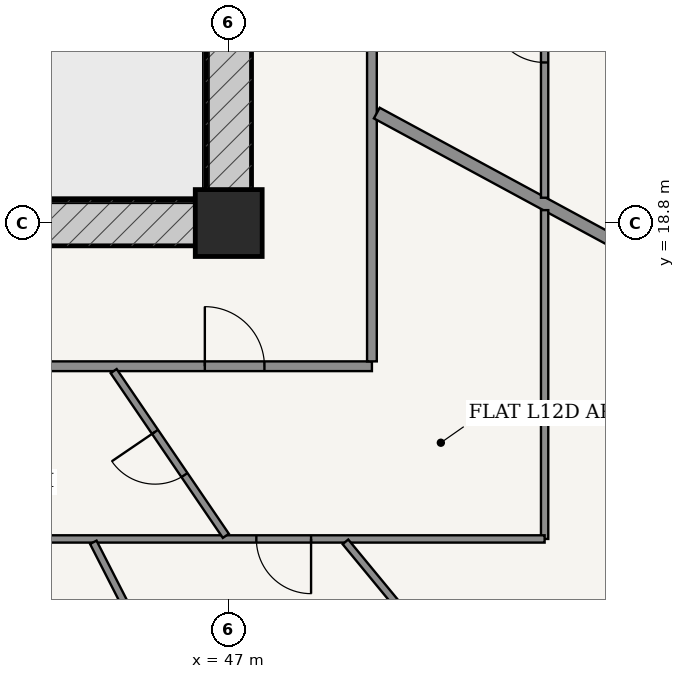
"""IFC4 building model, lengths in metres.
Left out: names, types, materials, properties, quantities, classifications, styles, units other than length and angle.
Written with IfcOpenShell. Run it as: python <this file> out.ifc"""

import sys

from ifc_helpers import new_model, si_unit, direction, frame, frame_2d, origin, origin_2d, place, context, subcontext, project, spatial, rectangle, extrude, source, transform, mapped, element, fill, save


model = new_model("IFC4")
c1 = context("Model", 3, precision=1e-05, world=origin(), true_north=direction((-0.2419218956, 0.970295726276)))
c2 = subcontext(c1, "Body", "Model", "MODEL_VIEW")
j1 = project(units=[si_unit("LENGTHUNIT", "METRE"), si_unit("PLANEANGLEUNIT", "RADIAN")], contexts=[c1])
p1 = place(None, origin())
s1 = spatial("IfcSite", under=j1, at=p1, CompositionType="ELEMENT")
p2 = place(p1, origin())
s2 = spatial("IfcBuilding", under=s1, at=p2, CompositionType="ELEMENT")
p3 = place(p2, frame((0.0, 0.0, 49.2)))
s3 = spatial("IfcBuildingStorey", under=s2, at=p3, CompositionType="ELEMENT", Elevation=49.2)
p4 = place(p3, frame((47.0, 18.8, 0.0), z_axis=(0.0, 0.0, 1.0), x_axis=(1.0, 0.0, 0.0)))
e1 = element("IfcColumn", 1, at=p4, inside=s3, PredefinedType="COLUMN", context=c2, shape_type="SweptSolid", body=[
    extrude(rectangle(XDim=1.1, YDim=1.1, at=origin_2d()), origin(), (0.0, 0.0, 1.0), 3.6),
])
p5 = place(p3, frame((28.625, 18.8, 0.0), z_axis=(0.0, 0.0, 1.0), x_axis=(1.0, 0.0, 0.0)))
e2 = element("IfcWall", 2, at=p5, inside=s3, PredefinedType="SHEAR", context=c2, shape_type="SweptSolid", body=[
    extrude(rectangle(XDim=18.75, YDim=0.75, at=frame_2d((9.375, 0.0))), origin(), (0.0, 0.0, 1.0), 3.32),
])
p6 = place(p5, frame((7.627, 0.0, 0.0)))
e3 = element("IfcOpeningElement", 3, at=p6, cuts=e2, PredefinedType="OPENING", context=c2, shape_type="SweptSolid", body=[
    extrude(rectangle(XDim=0.85, YDim=2.1, at=frame_2d((0.425, 1.05))), frame((0.0, 0.385, 0.0), z_axis=(0.0, -1.0, 0.0), x_axis=(1.0, 0.0, 0.0)), (0.0, 0.0, 1.0), 0.77),
])
p7 = place(p5, frame((10.673, 0.0, 0.0)))
e4 = element("IfcOpeningElement", 4, at=p7, cuts=e2, PredefinedType="OPENING", context=c2, shape_type="SweptSolid", body=[
    extrude(rectangle(XDim=0.85, YDim=2.1, at=frame_2d((0.425, 1.05))), frame((0.0, 0.385, 0.0), z_axis=(0.0, -1.0, 0.0), x_axis=(1.0, 0.0, 0.0)), (0.0, 0.0, 1.0), 0.77),
])
p8 = place(p3, frame((47.0, 19.175, 0.0), z_axis=(0.0, 0.0, 1.0), x_axis=(0.0, 1.0, 0.0)))
e5 = element("IfcWall", 5, at=p8, inside=s3, PredefinedType="SHEAR", context=c2, shape_type="SweptSolid", body=[
    extrude(rectangle(XDim=15.25, YDim=0.75, at=frame_2d((7.625, 0.0))), origin(), (0.0, 0.0, 1.0), 3.32),
])
p9 = place(p8, frame((9.875, 0.0, 0.0)))
e6 = element("IfcOpeningElement", 6, at=p9, cuts=e5, PredefinedType="OPENING", context=c2, shape_type="SweptSolid", body=[
    extrude(rectangle(XDim=1.5, YDim=2.2, at=frame_2d((0.75, 1.1))), frame((0.0, 0.385, 0.0), z_axis=(0.0, -1.0, 0.0), x_axis=(1.0, 0.0, 0.0)), (0.0, 0.0, 1.0), 0.77),
])
p10 = place(p3, frame((26.645, 16.445, 0.0), z_axis=(0.0, 0.0, 1.0), x_axis=(1.0, 0.0, 0.0)))
e7 = element("IfcWall", 7, at=p10, inside=s3, PredefinedType="PARTITIONING", context=c2, shape_type="SweptSolid", body=[
    extrude(rectangle(XDim=22.71, YDim=0.16, at=frame_2d((11.355, 0.0))), origin(), (0.0, 0.0, 1.0), 2.688),
])
p11 = place(p10, frame((19.962, 0.0, 0.0)))
e8 = element("IfcOpeningElement", 8, at=p11, cuts=e7, PredefinedType="OPENING", context=c2, shape_type="SweptSolid", body=[
    extrude(rectangle(XDim=0.98, YDim=2.2, at=frame_2d((0.49, 1.1))), frame((0.0, 0.09, 0.0), z_axis=(0.0, -1.0, 0.0), x_axis=(1.0, 0.0, 0.0)), (0.0, 0.0, 1.0), 0.18),
])
p12 = place(p3, frame((49.355, 16.525, 0.0), z_axis=(0.0, 0.0, 1.0), x_axis=(0.0, 1.0, 0.0)))
e9 = element("IfcWall", 9, at=p12, inside=s3, PredefinedType="PARTITIONING", context=c2, shape_type="SweptSolid", body=[
    extrude(rectangle(XDim=20.55, YDim=0.16, at=frame_2d((10.275, 0.0))), origin(), (0.0, 0.0, 1.0), 2.688),
])
p13 = place(p3, frame((49.435, 20.608, 0.0), z_axis=(0.0, 0.0, 1.0), x_axis=(0.879369737803, -0.476139542819, 0.0)))
e10 = element("IfcWall", 10, at=p13, inside=s3, PredefinedType="PARTITIONING", context=c2, shape_type="SweptSolid", body=[
    extrude(rectangle(XDim=14.295, YDim=0.2, at=frame_2d((7.147, 0.0))), origin(), (0.0, 0.0, 1.0), 2.688),
])
p14 = place(p3, frame((52.195, 39.995, 0.0), z_axis=(0.0, 0.0, 1.0), x_axis=(0.0, -1.0, 0.0)))
e11 = element("IfcWall", 11, at=p14, inside=s3, PredefinedType="PARTITIONING", context=c2, shape_type="SweptSolid", body=[
    extrude(rectangle(XDim=20.779, YDim=0.12, at=frame_2d((10.39, 0.0))), origin(), (0.0, 0.0, 1.0), 2.688),
])
p15 = place(p14, frame((13.944, 0.0, 0.0)))
e12 = element("IfcOpeningElement", 12, at=p15, cuts=e11, PredefinedType="OPENING", context=c2, shape_type="SweptSolid", body=[
    extrude(rectangle(XDim=0.9, YDim=2.15, at=frame_2d((0.45, 1.075))), frame((0.0, 0.07, 0.0), z_axis=(0.0, -1.0, 0.0), x_axis=(1.0, 0.0, 0.0)), (0.0, 0.0, 1.0), 0.14),
])
p16 = place(p14, frame((17.655, 0.0, 0.0)))
e13 = element("IfcOpeningElement", 13, at=p16, cuts=e11, PredefinedType="OPENING", context=c2, shape_type="SweptSolid", body=[
    extrude(rectangle(XDim=0.9, YDim=2.15, at=frame_2d((0.45, 1.075))), frame((0.0, 0.07, 0.0), z_axis=(0.0, -1.0, 0.0), x_axis=(1.0, 0.0, 0.0)), (0.0, 0.0, 1.0), 0.14),
])
p17 = place(p3, frame((52.195, 19.012, 0.0), z_axis=(0.0, 0.0, 1.0), x_axis=(0.0, -1.0, 0.0)))
e14 = element("IfcWall", 14, at=p17, inside=s3, PredefinedType="PARTITIONING", context=c2, shape_type="SweptSolid", body=[
    extrude(rectangle(XDim=5.407, YDim=0.12, at=frame_2d((2.704, 0.0))), origin(), (0.0, 0.0, 1.0), 2.999),
])
p18 = place(p3, frame((52.195, 13.605, 0.0), z_axis=(0.0, 0.0, 1.0), x_axis=(-1.0, 0.0, 0.0)))
e15 = element("IfcWall", 15, at=p18, inside=s3, PredefinedType="PARTITIONING", context=c2, shape_type="SweptSolid", body=[
    extrude(rectangle(XDim=24.973, YDim=0.12, at=frame_2d((12.487, 0.0))), origin(), (0.0, 0.0, 1.0), 2.688),
])
p19 = place(p18, frame((3.841, 0.0, 0.0)))
e16 = element("IfcOpeningElement", 16, at=p19, cuts=e15, PredefinedType="OPENING", context=c2, shape_type="SweptSolid", body=[
    extrude(rectangle(XDim=0.9, YDim=2.15, at=frame_2d((0.45, 1.075))), frame((0.0, 0.07, 0.0), z_axis=(0.0, -1.0, 0.0), x_axis=(1.0, 0.0, 0.0)), (0.0, 0.0, 1.0), 0.14),
])
p20 = place(p18, frame((15.819, 0.0, 0.0)))
e17 = element("IfcOpeningElement", 17, at=p20, cuts=e15, PredefinedType="OPENING", context=c2, shape_type="SweptSolid", body=[
    extrude(rectangle(XDim=0.9, YDim=2.15, at=frame_2d((0.45, 1.075))), frame((0.0, 0.07, 0.0), z_axis=(0.0, -1.0, 0.0), x_axis=(1.0, 0.0, 0.0)), (0.0, 0.0, 1.0), 0.14),
])
p21 = place(p18, frame((21.123, 0.0, 0.0)))
e18 = element("IfcOpeningElement", 18, at=p21, cuts=e15, PredefinedType="OPENING", context=c2, shape_type="SweptSolid", body=[
    extrude(rectangle(XDim=0.9, YDim=2.15, at=frame_2d((0.45, 1.075))), frame((0.0, 0.07, 0.0), z_axis=(0.0, -1.0, 0.0), x_axis=(1.0, 0.0, 0.0)), (0.0, 0.0, 1.0), 0.14),
])
p22 = place(p3, frame((44.773, 13.55, 0.0), z_axis=(0.0, 0.0, 1.0), x_axis=(0.455131567849, -0.890424200001, 0.0)))
e19 = element("IfcWall", 19, at=p22, inside=s3, PredefinedType="PARTITIONING", context=c2, shape_type="SweptSolid", body=[
    extrude(rectangle(XDim=9.439, YDim=0.12, at=frame_2d((4.719, 0.0))), origin(), (0.0, 0.0, 1.0), 2.762),
])
p23 = place(p22, frame((4.269, 0.0, 0.0)))
e20 = element("IfcOpeningElement", 20, at=p23, cuts=e19, PredefinedType="OPENING", context=c2, shape_type="SweptSolid", body=[
    extrude(rectangle(XDim=0.9, YDim=2.15, at=frame_2d((0.45, 1.075))), frame((0.0, 0.07, 0.0), z_axis=(0.0, -1.0, 0.0), x_axis=(1.0, 0.0, 0.0)), (0.0, 0.0, 1.0), 0.14),
])
p24 = place(p3, frame((48.919, 13.557, 0.0), z_axis=(0.0, 0.0, 1.0), x_axis=(0.636193310573, -0.771529695852, 0.0)))
e21 = element("IfcWall", 21, at=p24, inside=s3, PredefinedType="PARTITIONING", context=c2, shape_type="SweptSolid", body=[
    extrude(rectangle(XDim=8.044, YDim=0.12, at=frame_2d((4.022, 0.0))), origin(), (0.0, 0.0, 1.0), 2.688),
])
p25 = place(p24, frame((2.508, 0.0, 0.0)))
e22 = element("IfcOpeningElement", 22, at=p25, cuts=e21, PredefinedType="OPENING", context=c2, shape_type="SweptSolid", body=[
    extrude(rectangle(XDim=0.9, YDim=2.15, at=frame_2d((0.45, 1.075))), frame((0.0, 0.07, 0.0), z_axis=(0.0, -1.0, 0.0), x_axis=(1.0, 0.0, 0.0)), (0.0, 0.0, 1.0), 0.14),
])
p26 = place(p3, frame((45.108, 16.365, 0.0), z_axis=(0.0, 0.0, 1.0), x_axis=(0.562992379509, -0.826462086617, 0.0)))
e23 = element("IfcWall", 23, at=p26, inside=s3, PredefinedType="PARTITIONING", context=c2, shape_type="SweptSolid", body=[
    extrude(rectangle(XDim=3.278, YDim=0.12, at=frame_2d((1.639, 0.0))), origin(), (0.0, 0.0, 1.0), 3.32),
])
p27 = place(p26, frame((1.209, 0.0, 0.0)))
e24 = element("IfcOpeningElement", 24, at=p27, cuts=e23, PredefinedType="OPENING", context=c2, shape_type="SweptSolid", body=[
    extrude(rectangle(XDim=0.86, YDim=2.15, at=frame_2d((0.43, 1.075))), frame((0.0, 0.07, 0.0), z_axis=(0.0, -1.0, 0.0), x_axis=(1.0, 0.0, 0.0)), (0.0, 0.0, 1.0), 0.14),
])
m1 = source(origin(), c2, "Body", "SweptSolid", [
    extrude(rectangle(XDim=0.9, YDim=2.15, at=frame_2d((0.45, 1.075))), frame((0.0, 0.025, 0.0), z_axis=(0.0, -1.0, 0.0), x_axis=(1.0, 0.0, 0.0)), (0.0, 0.0, 1.0), 0.05),
])
p28 = place(p16, frame((0.9, 0.0, 0.0), z_axis=(0.0, 0.0, 1.0), x_axis=(-1.0, 0.0, 0.0)))
e25 = element("IfcDoor", 25, at=p28, inside=s3, OperationType="SINGLE_SWING_RIGHT", PredefinedType="DOOR", context=c2, shape_type="MappedRepresentation", body=[
    mapped(m1, transform((0.0, 0.0, 0.0), scale=1.0)),
])
fill(e13, e25)
m2 = source(origin(), c2, "Body", "SweptSolid", [
    extrude(rectangle(XDim=0.98, YDim=2.2, at=frame_2d((0.49, 1.1))), frame((0.0, 0.025, 0.0), z_axis=(0.0, -1.0, 0.0), x_axis=(1.0, 0.0, 0.0)), (0.0, 0.0, 1.0), 0.05),
])
p29 = place(p11, origin())
e26 = element("IfcDoor", 26, at=p29, inside=s3, OperationType="SINGLE_SWING_LEFT", PredefinedType="DOOR", context=c2, shape_type="MappedRepresentation", body=[
    mapped(m2, transform((0.0, 0.0, 0.0), scale=1.0)),
])
fill(e8, e26)
m3 = source(origin(), c2, "Body", "SweptSolid", [
    extrude(rectangle(XDim=0.86, YDim=2.15, at=frame_2d((0.43, 1.075))), frame((0.0, 0.025, 0.0), z_axis=(0.0, -1.0, 0.0), x_axis=(1.0, 0.0, 0.0)), (0.0, 0.0, 1.0), 0.05),
])
p30 = place(p27, frame((0.86, 0.0, 0.0), z_axis=(0.0, 0.0, 1.0), x_axis=(-1.0, 0.0, 0.0)))
e27 = element("IfcDoor", 27, at=p30, inside=s3, OperationType="SINGLE_SWING_RIGHT", PredefinedType="DOOR", context=c2, shape_type="MappedRepresentation", body=[
    mapped(m3, transform((0.0, 0.0, 0.0), scale=1.0)),
])
fill(e24, e27)
p31 = place(p19, origin())
e28 = element("IfcDoor", 28, at=p31, inside=s3, OperationType="SINGLE_SWING_LEFT", PredefinedType="DOOR", context=c2, shape_type="MappedRepresentation", body=[
    mapped(m1, transform((0.0, 0.0, 0.0), scale=1.0)),
])
fill(e16, e28)
save(model, sys.argv[1])
